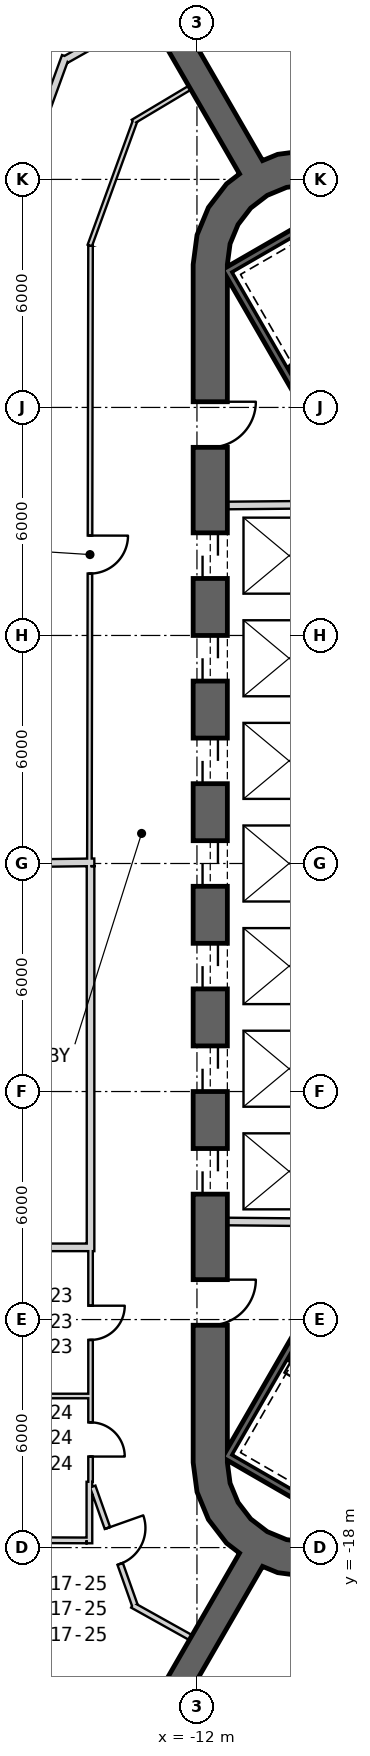
"""IFC4 building model, lengths in metres.
Left out: names, types, materials, properties, quantities, classifications, styles, units other than length and angle.
Written with IfcOpenShell. Run it as: python <this file> out.ifc"""

import sys

from ifc_helpers import new_model, si_unit, direction, frame, frame_2d, origin, place, context, subcontext, project, spatial, polyline, rectangle, outline, extrude, element, fill, save


model = new_model("IFC4")
c1 = context("Model", 3, precision=1e-05, world=origin(), true_north=direction((0.0, 1.0)))
c2 = subcontext(c1, "Body", "Model", "MODEL_VIEW")
j1 = project(units=[si_unit("LENGTHUNIT", "METRE"), si_unit("PLANEANGLEUNIT", "RADIAN")], contexts=[c1])
p1 = place(None, origin())
s1 = spatial("IfcSite", under=j1, at=p1, CompositionType="ELEMENT")
p2 = place(p1, origin())
s2 = spatial("IfcBuilding", under=s1, at=p2, CompositionType="ELEMENT")
p3 = place(p2, frame((0.0, 0.0, 265.2)))
s3 = spatial("IfcBuildingStorey", under=s2, at=p3, CompositionType="ELEMENT", Elevation=265.2)
p4 = place(p3, frame((-11.65, 15.762, 0.0), z_axis=(0.0, 0.0, 1.0), x_axis=(0.0, -1.0, 0.0)))
e1 = element("IfcWall", 1, at=p4, inside=s3, PredefinedType="SHEAR", context=c2, shape_type="SweptSolid", body=[
    extrude(rectangle(XDim=31.523, YDim=0.9, at=frame_2d((15.762, 0.0))), origin(), (0.0, 0.0, 1.0), 4.0),
])
p5 = place(p4, frame((7.062, 0.0, 0.0)))
e2 = element("IfcOpeningElement", 2, at=p5, cuts=e1, PredefinedType="OPENING", context=c2, shape_type="SweptSolid", body=[
    extrude(rectangle(XDim=1.2, YDim=2.4, at=frame_2d((0.6, 1.2))), frame((0.0, 0.46, 0.0), z_axis=(0.0, -1.0, 0.0), x_axis=(1.0, 0.0, 0.0)), (0.0, 0.0, 1.0), 0.92),
])
p6 = place(p4, frame((9.762, 0.0, 0.0)))
e3 = element("IfcOpeningElement", 3, at=p6, cuts=e1, PredefinedType="OPENING", context=c2, shape_type="SweptSolid", body=[
    extrude(rectangle(XDim=1.2, YDim=2.4, at=frame_2d((0.6, 1.2))), frame((0.0, 0.46, 0.0), z_axis=(0.0, -1.0, 0.0), x_axis=(1.0, 0.0, 0.0)), (0.0, 0.0, 1.0), 0.92),
])
p7 = place(p4, frame((12.462, 0.0, 0.0)))
e4 = element("IfcOpeningElement", 4, at=p7, cuts=e1, PredefinedType="OPENING", context=c2, shape_type="SweptSolid", body=[
    extrude(rectangle(XDim=1.2, YDim=2.4, at=frame_2d((0.6, 1.2))), frame((0.0, 0.46, 0.0), z_axis=(0.0, -1.0, 0.0), x_axis=(1.0, 0.0, 0.0)), (0.0, 0.0, 1.0), 0.92),
])
p8 = place(p4, frame((15.162, 0.0, 0.0)))
e5 = element("IfcOpeningElement", 5, at=p8, cuts=e1, PredefinedType="OPENING", context=c2, shape_type="SweptSolid", body=[
    extrude(rectangle(XDim=1.2, YDim=2.4, at=frame_2d((0.6, 1.2))), frame((0.0, 0.46, 0.0), z_axis=(0.0, -1.0, 0.0), x_axis=(1.0, 0.0, 0.0)), (0.0, 0.0, 1.0), 0.92),
])
p9 = place(p4, frame((17.862, 0.0, 0.0)))
e6 = element("IfcOpeningElement", 6, at=p9, cuts=e1, PredefinedType="OPENING", context=c2, shape_type="SweptSolid", body=[
    extrude(rectangle(XDim=1.2, YDim=2.4, at=frame_2d((0.6, 1.2))), frame((0.0, 0.46, 0.0), z_axis=(0.0, -1.0, 0.0), x_axis=(1.0, 0.0, 0.0)), (0.0, 0.0, 1.0), 0.92),
])
p10 = place(p4, frame((20.562, 0.0, 0.0)))
e7 = element("IfcOpeningElement", 7, at=p10, cuts=e1, PredefinedType="OPENING", context=c2, shape_type="SweptSolid", body=[
    extrude(rectangle(XDim=1.2, YDim=2.4, at=frame_2d((0.6, 1.2))), frame((0.0, 0.46, 0.0), z_axis=(0.0, -1.0, 0.0), x_axis=(1.0, 0.0, 0.0)), (0.0, 0.0, 1.0), 0.92),
])
p11 = place(p4, frame((23.262, 0.0, 0.0)))
e8 = element("IfcOpeningElement", 8, at=p11, cuts=e1, PredefinedType="OPENING", context=c2, shape_type="SweptSolid", body=[
    extrude(rectangle(XDim=1.2, YDim=2.4, at=frame_2d((0.6, 1.2))), frame((0.0, 0.46, 0.0), z_axis=(0.0, -1.0, 0.0), x_axis=(1.0, 0.0, 0.0)), (0.0, 0.0, 1.0), 0.92),
])
p12 = place(p4, frame((3.612, 0.0, 0.0)))
e9 = element("IfcOpeningElement", 9, at=p12, cuts=e1, PredefinedType="OPENING", context=c2, shape_type="SweptSolid", body=[
    extrude(rectangle(XDim=1.2, YDim=2.4, at=frame_2d((0.6, 1.2))), frame((0.0, 0.46, 0.0), z_axis=(0.0, -1.0, 0.0), x_axis=(1.0, 0.0, 0.0)), (0.0, 0.0, 1.0), 0.92),
])
p13 = place(p4, frame((26.712, 0.0, 0.0)))
e10 = element("IfcOpeningElement", 10, at=p13, cuts=e1, PredefinedType="OPENING", context=c2, shape_type="SweptSolid", body=[
    extrude(rectangle(XDim=1.2, YDim=2.4, at=frame_2d((0.6, 1.2))), frame((0.0, 0.46, 0.0), z_axis=(0.0, -1.0, 0.0), x_axis=(1.0, 0.0, 0.0)), (0.0, 0.0, 1.0), 0.92),
])
p14 = place(p3, origin())
e11 = element("IfcWall", 11, at=p14, inside=s3, PredefinedType="SHEAR", context=c2, shape_type="SweptSolid", body=[
    extrude(outline(polyline([(-7.6, 18.36), (-8.323, 18.659), (-9.1, 18.762), (-9.876, 18.659), (-10.6, 18.36), (-11.221, 17.883), (-11.698, 17.262), (-11.998, 16.538), (-12.1, 15.762), (-11.2, 15.762), (-11.128, 16.305), (-10.919, 16.812), (-10.585, 17.247), (-10.15, 17.58), (-9.644, 17.79), (-9.1, 17.862), (-8.556, 17.79), (-8.05, 17.58), (-7.6, 18.36)])), origin(), (0.0, 0.0, 1.0), 4.0),
])
p15 = place(p3, origin())
e12 = element("IfcWall", 12, at=p15, inside=s3, PredefinedType="SHEAR", context=c2, shape_type="SweptSolid", body=[
    extrude(outline(polyline([(-12.1, -15.762), (-11.998, -16.538), (-11.698, -17.262), (-11.221, -17.883), (-10.6, -18.36), (-9.876, -18.659), (-9.1, -18.762), (-8.323, -18.659), (-7.6, -18.36), (-8.05, -17.58), (-8.556, -17.79), (-9.1, -17.862), (-9.644, -17.79), (-10.15, -17.58), (-10.585, -17.247), (-10.919, -16.812), (-11.128, -16.305), (-11.2, -15.762), (-12.1, -15.762)])), origin(), (0.0, 0.0, 1.0), 4.0),
])
for number, where, z_axis, x_axis in (
    (13, (-10.575, 18.316, 0.0), (0.0, 0.0, 1.0), (-0.5, 0.866, 0.0)),
    (14, (-10.575, -18.316, 0.0), (0.0, 0.0, 1.0), (-0.5, -0.866, 0.0)),
):
    element("IfcWall", number, at=place(p3, frame(where, z_axis=z_axis, x_axis=x_axis)), inside=s3, PredefinedType="SHEAR", context=c2, shape_type="SweptSolid", body=[
        extrude(rectangle(XDim=9.965, YDim=0.7, at=frame_2d((4.982, 0.0))), origin(), (0.0, 0.0, 1.0), 4.0),
    ])
p16 = place(p3, frame((-11.2, 9.42, 0.0), z_axis=(0.0, 0.0, 1.0), x_axis=(0.999957167047, 0.009255488683, 0.0)))
e15 = element("IfcWall", 15, at=p16, inside=s3, PredefinedType="PLUMBINGWALL", context=c2, shape_type="SweptSolid", body=[
    extrude(rectangle(XDim=3.35, YDim=0.2, at=frame_2d((1.675, 0.0))), origin(), (0.0, 0.0, 1.0), 3.7),
])
p17 = place(p3, frame((-8.05, -9.449, 0.0), z_axis=(0.0, 0.0, 1.0), x_axis=(-0.999957467379, 0.009222983926, 0.0)))
e16 = element("IfcWall", 16, at=p17, inside=s3, PredefinedType="PLUMBINGWALL", context=c2, shape_type="SweptSolid", body=[
    extrude(rectangle(XDim=3.15, YDim=0.2, at=frame_2d((1.575, 0.0))), origin(), (0.0, 0.0, 1.0), 3.7),
])
p18 = place(p3, frame((-11.245, 15.678, -0.3), z_axis=(0.0, 0.0, 1.0), x_axis=(0.499977274689, -0.866038523851, 0.0)))
e17 = element("IfcWall", 17, at=p18, inside=s3, PredefinedType="SHEAR", context=c2, shape_type="SweptSolid", body=[
    extrude(rectangle(XDim=8.1, YDim=0.2, at=frame_2d((4.05, 0.0))), origin(), (0.0, 0.0, 1.0), 4.0),
])
for number, where, z_axis, x_axis in (
    (18, (-7.818, 17.541, -0.3), (0.0, 0.0, 1.0), (-0.866, -0.5, 0.0)),
    (19, (-11.282, -15.541, -0.3), (0.0, 0.0, 1.0), (0.866, -0.5, 0.0)),
):
    element("IfcWall", number, at=place(p3, frame(where, z_axis=z_axis, x_axis=x_axis)), inside=s3, PredefinedType="SHEAR", context=c2, shape_type="SweptSolid", body=[
        extrude(rectangle(XDim=3.8, YDim=0.2, at=frame_2d((1.9, 0.0))), origin(), (0.0, 0.0, 1.0), 4.0),
    ])
p19 = place(p3, frame((-7.196, -8.663, -0.3), z_axis=(0.0, 0.0, 1.0), x_axis=(-0.499997992926, -0.866026562566, 0.0)))
e20 = element("IfcWall", 20, at=p19, inside=s3, PredefinedType="SHEAR", context=c2, shape_type="SweptSolid", body=[
    extrude(rectangle(XDim=7.9, YDim=0.2, at=frame_2d((3.95, 0.0))), origin(), (0.0, 0.0, 1.0), 4.0),
])
p20 = place(p3, frame((-12.189, 20.411, 0.0), z_axis=(0.0, 0.0, 1.0), x_axis=(-0.858492721014, -0.51282574815, 0.0)))
e21 = element("IfcWall", 21, at=p20, inside=s3, PredefinedType="PARTITIONING", context=c2, shape_type="SweptSolid", body=[
    extrude(rectangle(XDim=1.742, YDim=0.12, at=frame_2d((0.871, 0.0))), origin(), (0.0, 0.0, 1.0), 3.7),
])
p21 = place(p3, frame((-13.631, 19.53, 0.0), z_axis=(0.0, 0.0, 1.0), x_axis=(-0.342069878069, -0.939674517329, 0.0)))
e22 = element("IfcWall", 22, at=p21, inside=s3, PredefinedType="PARTITIONING", context=c2, shape_type="SweptSolid", body=[
    extrude(rectangle(XDim=3.479, YDim=0.12, at=frame_2d((1.739, 0.0))), origin(), (0.0, 0.0, 1.0), 2.88),
])
p22 = place(p3, frame((-14.8, 16.257, 0.0), z_axis=(0.0, 0.0, 1.0), x_axis=(-0.001847148781, -0.999998294019, 0.0)))
e23 = element("IfcWall", 23, at=p22, inside=s3, PredefinedType="PARTITIONING", context=c2, shape_type="SweptSolid", body=[
    extrude(rectangle(XDim=16.257, YDim=0.12, at=frame_2d((8.128, 0.0))), origin(), (0.0, 0.0, 1.0), 2.98),
])
p23 = place(p22, frame((7.629, 0.0, 0.0)))
e24 = element("IfcOpeningElement", 24, at=p23, cuts=e23, PredefinedType="OPENING", context=c2, shape_type="SweptSolid", body=[
    extrude(rectangle(XDim=1.0, YDim=2.1, at=frame_2d((0.5, 1.05))), frame((0.0, 0.07, 0.0), z_axis=(0.0, -1.0, 0.0), x_axis=(1.0, 0.0, 0.0)), (0.0, 0.0, 1.0), 0.14),
])
p24 = place(p3, frame((-14.8, -10.13, 0.0), z_axis=(0.0, 0.0, 1.0), x_axis=(0.0, -1.0, 0.0)))
e25 = element("IfcWall", 25, at=p24, inside=s3, PredefinedType="PARTITIONING", context=c2, shape_type="SweptSolid", body=[
    extrude(rectangle(XDim=6.138, YDim=0.12, at=frame_2d((3.069, 0.0))), origin(), (0.0, 0.0, 1.0), 2.98),
])
p25 = place(p24, frame((1.506, 0.0, 0.0)))
e26 = element("IfcOpeningElement", 26, at=p25, cuts=e25, PredefinedType="OPENING", context=c2, shape_type="SweptSolid", body=[
    extrude(rectangle(XDim=0.9, YDim=2.1, at=frame_2d((0.45, 1.05))), frame((0.0, 0.07, 0.0), z_axis=(0.0, -1.0, 0.0), x_axis=(1.0, 0.0, 0.0)), (0.0, 0.0, 1.0), 0.14),
])
p26 = place(p24, frame((4.575, 0.0, 0.0)))
e27 = element("IfcOpeningElement", 27, at=p26, cuts=e25, PredefinedType="OPENING", context=c2, shape_type="SweptSolid", body=[
    extrude(rectangle(XDim=0.9, YDim=2.1, at=frame_2d((0.45, 1.05))), frame((0.0, 0.07, 0.0), z_axis=(0.0, -1.0, 0.0), x_axis=(1.0, 0.0, 0.0)), (0.0, 0.0, 1.0), 0.14),
])
p27 = place(p3, frame((-17.2, -0.001, 0.0), z_axis=(0.0, 0.0, 1.0), x_axis=(0.999915662945, 0.012987185857, 0.0)))
e28 = element("IfcWall", 28, at=p27, inside=s3, PredefinedType="PARTITIONING", context=c2, shape_type="SweptSolid", body=[
    extrude(rectangle(XDim=2.5, YDim=0.2, at=frame_2d((1.25, 0.0))), origin(), (0.0, 0.0, 1.0), 3.07),
])
p28 = place(p3, frame((-15.456, 21.239, 0.0), z_axis=(0.0, 0.0, 1.0), x_axis=(-0.34205546997, -0.939679762187, 0.0)))
e29 = element("IfcWall", 29, at=p28, inside=s3, PredefinedType="PARTITIONING", context=c2, shape_type="SweptSolid", body=[
    extrude(rectangle(XDim=4.706, YDim=0.2, at=frame_2d((2.353, 0.0))), origin(), (0.0, 0.0, 1.0), 2.88),
])
p29 = place(p3, frame((-13.313, 22.359, 0.0), z_axis=(0.0, 0.0, 1.0), x_axis=(-0.87121710687, -0.490897904555, 0.0)))
e30 = element("IfcWall", 30, at=p29, inside=s3, PredefinedType="PARTITIONING", context=c2, shape_type="SweptSolid", body=[
    extrude(rectangle(XDim=2.457, YDim=0.2, at=frame_2d((1.229, 0.0))), origin(), (0.0, 0.0, 1.0), 3.7),
])
p30 = place(p3, frame((-14.8, -0.07, 0.0), z_axis=(0.0, 0.0, 1.0), x_axis=(0.0, -1.0, 0.0)))
e31 = element("IfcWall", 31, at=p30, inside=s3, PredefinedType="PARTITIONING", context=c2, shape_type="SweptSolid", body=[
    extrude(rectangle(XDim=10.13, YDim=0.2, at=frame_2d((5.065, 0.0))), origin(), (0.0, 0.0, 1.0), 3.07),
])
p31 = place(p3, frame((-13.696, -19.514, 0.0), z_axis=(0.0, 0.0, 1.0), x_axis=(0.873335409284, -0.487119351792, 0.0)))
e32 = element("IfcWall", 32, at=p31, inside=s3, PredefinedType="PLUMBINGWALL", context=c2, shape_type="SweptSolid", body=[
    extrude(rectangle(XDim=1.754, YDim=0.15, at=frame_2d((0.877, 0.0))), origin(), (0.0, 0.0, 1.0), 3.7),
])
p32 = place(p3, frame((-14.743, -16.394, 0.0), z_axis=(0.0, 0.0, 1.0), x_axis=(0.334298080075, -0.942467396602, 0.0)))
e33 = element("IfcWall", 33, at=p32, inside=s3, PredefinedType="PLUMBINGWALL", context=c2, shape_type="SweptSolid", body=[
    extrude(rectangle(XDim=3.317, YDim=0.15, at=frame_2d((1.659, 0.0))), origin(), (0.0, 0.0, 1.0), 2.88),
])
p33 = place(p32, frame((1.158, 0.0, 0.0)))
e34 = element("IfcOpeningElement", 34, at=p33, cuts=e33, PredefinedType="OPENING", context=c2, shape_type="SweptSolid", body=[
    extrude(rectangle(XDim=1.0, YDim=2.1, at=frame_2d((0.5, 1.05))), frame((0.0, 0.085, 0.0), z_axis=(0.0, -1.0, 0.0), x_axis=(1.0, 0.0, 0.0)), (0.0, 0.0, 1.0), 0.17),
])
p34 = place(p3, frame((-14.9, -10.1, 0.0), z_axis=(0.0, 0.0, 1.0), x_axis=(-1.0, 0.0, 0.0)))
e35 = element("IfcWall", 35, at=p34, inside=s3, PredefinedType="PARTITIONING", context=c2, shape_type="SweptSolid", body=[
    extrude(rectangle(XDim=7.48, YDim=0.2, at=frame_2d((3.74, 0.0))), origin(), (0.0, 0.0, 1.0), 3.07),
])
p35 = place(p3, frame((-22.18, -14.011, 0.0), z_axis=(0.0, 0.0, 1.0), x_axis=(1.0, 0.0, 0.0)))
e36 = element("IfcWall", 36, at=p35, inside=s3, PredefinedType="PARTITIONING", context=c2, shape_type="SweptSolid", body=[
    extrude(rectangle(XDim=7.35, YDim=0.12, at=frame_2d((3.675, 0.0))), origin(), (0.0, 0.0, 1.0), 3.7),
])
p36 = place(p3, frame((-14.83, -17.886, 0.0), z_axis=(0.0, 0.0, 1.0), x_axis=(0.0, 1.0, 0.0)))
e37 = element("IfcWall", 37, at=p36, inside=s3, PredefinedType="PLUMBINGWALL", context=c2, shape_type="SweptSolid", body=[
    extrude(rectangle(XDim=1.618, YDim=0.15, at=frame_2d((0.809, 0.0))), origin(), (0.0, 0.0, 1.0), 3.7),
])
p37 = place(p3, frame((-14.905, -17.811, 0.0), z_axis=(0.0, 0.0, 1.0), x_axis=(-0.999991891267, 0.004027083259, 0.0)))
e38 = element("IfcWall", 38, at=p37, inside=s3, PredefinedType="PLUMBINGWALL", context=c2, shape_type="SweptSolid", body=[
    extrude(rectangle(XDim=7.275, YDim=0.15, at=frame_2d((3.637, 0.0))), origin(), (0.0, 0.0, 1.0), 2.98),
])
p38 = place(p23, origin())
e39 = element("IfcDoor", 39, at=p38, inside=s3, OperationType="SINGLE_SWING_RIGHT", PredefinedType="NOTDEFINED", context=c2, shape_type="SweptSolid", body=[
    extrude(rectangle(XDim=1.0, YDim=2.1, at=frame_2d((0.5, 1.05))), frame((0.0, 0.025, 0.0), z_axis=(0.0, -1.0, 0.0), x_axis=(1.0, 0.0, 0.0)), (0.0, 0.0, 1.0), 0.05),
])
fill(e24, e39)
p39 = place(p25, origin())
e40 = element("IfcDoor", 40, at=p39, inside=s3, OperationType="SINGLE_SWING_RIGHT", PredefinedType="NOTDEFINED", context=c2, shape_type="SweptSolid", body=[
    extrude(rectangle(XDim=0.9, YDim=2.1, at=frame_2d((0.45, 1.05))), frame((0.0, 0.025, 0.0), z_axis=(0.0, -1.0, 0.0), x_axis=(1.0, 0.0, 0.0)), (0.0, 0.0, 1.0), 0.05),
])
fill(e26, e40)
p40 = place(p26, origin())
e41 = element("IfcDoor", 41, at=p40, inside=s3, OperationType="SINGLE_SWING_RIGHT", PredefinedType="NOTDEFINED", context=c2, shape_type="SweptSolid", body=[
    extrude(rectangle(XDim=0.9, YDim=2.1, at=frame_2d((0.45, 1.05))), frame((0.0, 0.025, 0.0), z_axis=(0.0, -1.0, 0.0), x_axis=(1.0, 0.0, 0.0)), (0.0, 0.0, 1.0), 0.05),
])
fill(e27, e41)
p41 = place(p33, origin())
e42 = element("IfcDoor", 42, at=p41, inside=s3, OperationType="SINGLE_SWING_LEFT", PredefinedType="USERDEFINED", context=c2, shape_type="SweptSolid", body=[
    extrude(rectangle(XDim=1.0, YDim=2.1, at=frame_2d((0.5, 1.05))), frame((0.0, 0.025, 0.0), z_axis=(0.0, -1.0, 0.0), x_axis=(1.0, 0.0, 0.0)), (0.0, 0.0, 1.0), 0.05),
])
fill(e34, e42)
p42 = place(p5, origin())
e43 = element("IfcDoor", 43, at=p42, inside=s3, OperationType="SLIDING_TO_LEFT", PredefinedType="USERDEFINED", context=c2, shape_type="SweptSolid", body=[
    extrude(rectangle(XDim=1.2, YDim=2.4, at=frame_2d((0.6, 1.2))), frame((0.0, 0.025, 0.0), z_axis=(0.0, -1.0, 0.0), x_axis=(1.0, 0.0, 0.0)), (0.0, 0.0, 1.0), 0.05),
])
fill(e2, e43)
p43 = place(p6, origin())
e44 = element("IfcDoor", 44, at=p43, inside=s3, OperationType="SLIDING_TO_LEFT", PredefinedType="USERDEFINED", context=c2, shape_type="SweptSolid", body=[
    extrude(rectangle(XDim=1.2, YDim=2.4, at=frame_2d((0.6, 1.2))), frame((0.0, 0.025, 0.0), z_axis=(0.0, -1.0, 0.0), x_axis=(1.0, 0.0, 0.0)), (0.0, 0.0, 1.0), 0.05),
])
fill(e3, e44)
p44 = place(p7, origin())
e45 = element("IfcDoor", 45, at=p44, inside=s3, OperationType="SLIDING_TO_LEFT", PredefinedType="USERDEFINED", context=c2, shape_type="SweptSolid", body=[
    extrude(rectangle(XDim=1.2, YDim=2.4, at=frame_2d((0.6, 1.2))), frame((0.0, 0.025, 0.0), z_axis=(0.0, -1.0, 0.0), x_axis=(1.0, 0.0, 0.0)), (0.0, 0.0, 1.0), 0.05),
])
fill(e4, e45)
p45 = place(p8, origin())
e46 = element("IfcDoor", 46, at=p45, inside=s3, OperationType="SLIDING_TO_LEFT", PredefinedType="USERDEFINED", context=c2, shape_type="SweptSolid", body=[
    extrude(rectangle(XDim=1.2, YDim=2.4, at=frame_2d((0.6, 1.2))), frame((0.0, 0.025, 0.0), z_axis=(0.0, -1.0, 0.0), x_axis=(1.0, 0.0, 0.0)), (0.0, 0.0, 1.0), 0.05),
])
fill(e5, e46)
p46 = place(p9, origin())
e47 = element("IfcDoor", 47, at=p46, inside=s3, OperationType="SLIDING_TO_LEFT", PredefinedType="USERDEFINED", context=c2, shape_type="SweptSolid", body=[
    extrude(rectangle(XDim=1.2, YDim=2.4, at=frame_2d((0.6, 1.2))), frame((0.0, 0.025, 0.0), z_axis=(0.0, -1.0, 0.0), x_axis=(1.0, 0.0, 0.0)), (0.0, 0.0, 1.0), 0.05),
])
fill(e6, e47)
p47 = place(p10, origin())
e48 = element("IfcDoor", 48, at=p47, inside=s3, OperationType="SLIDING_TO_LEFT", PredefinedType="USERDEFINED", context=c2, shape_type="SweptSolid", body=[
    extrude(rectangle(XDim=1.2, YDim=2.4, at=frame_2d((0.6, 1.2))), frame((0.0, 0.025, 0.0), z_axis=(0.0, -1.0, 0.0), x_axis=(1.0, 0.0, 0.0)), (0.0, 0.0, 1.0), 0.05),
])
fill(e7, e48)
p48 = place(p11, origin())
e49 = element("IfcDoor", 49, at=p48, inside=s3, OperationType="SLIDING_TO_LEFT", PredefinedType="USERDEFINED", context=c2, shape_type="SweptSolid", body=[
    extrude(rectangle(XDim=1.2, YDim=2.4, at=frame_2d((0.6, 1.2))), frame((0.0, 0.025, 0.0), z_axis=(0.0, -1.0, 0.0), x_axis=(1.0, 0.0, 0.0)), (0.0, 0.0, 1.0), 0.05),
])
fill(e8, e49)
p49 = place(p12, origin())
e50 = element("IfcDoor", 50, at=p49, inside=s3, OperationType="SINGLE_SWING_RIGHT", PredefinedType="USERDEFINED", context=c2, shape_type="SweptSolid", body=[
    extrude(rectangle(XDim=1.2, YDim=2.4, at=frame_2d((0.6, 1.2))), frame((0.0, 0.025, 0.0), z_axis=(0.0, -1.0, 0.0), x_axis=(1.0, 0.0, 0.0)), (0.0, 0.0, 1.0), 0.05),
])
fill(e9, e50)
p50 = place(p13, origin())
e51 = element("IfcDoor", 51, at=p50, inside=s3, OperationType="SINGLE_SWING_RIGHT", PredefinedType="USERDEFINED", context=c2, shape_type="SweptSolid", body=[
    extrude(rectangle(XDim=1.2, YDim=2.4, at=frame_2d((0.6, 1.2))), frame((0.0, 0.025, 0.0), z_axis=(0.0, -1.0, 0.0), x_axis=(1.0, 0.0, 0.0)), (0.0, 0.0, 1.0), 0.05),
])
fill(e10, e51)
save(model, sys.argv[1])
